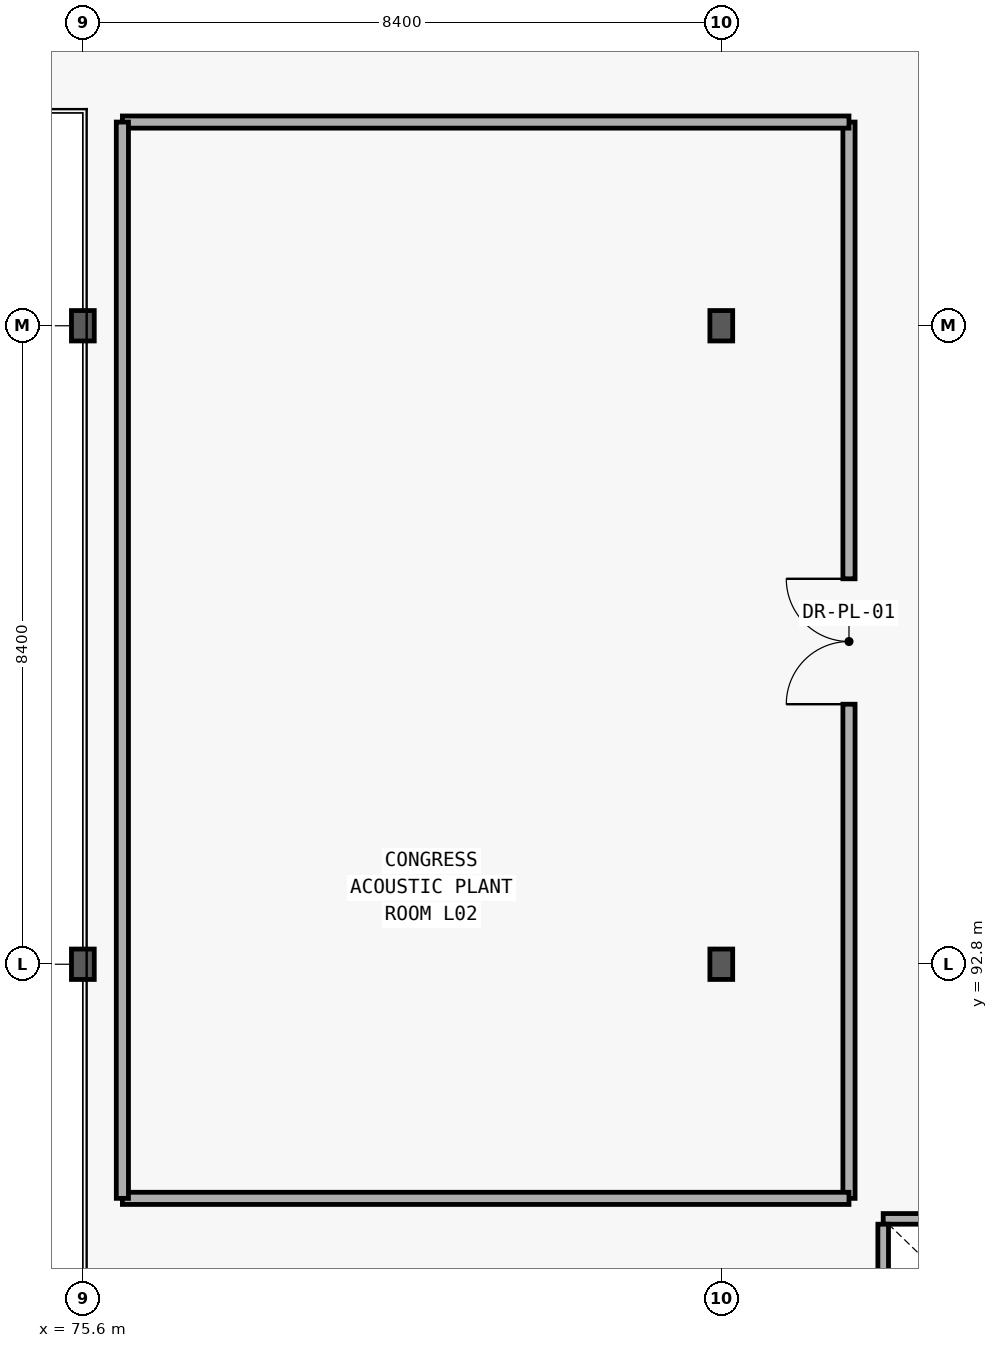
"""IFC4 building model, lengths in metres.
Left out: names, types, materials, properties, quantities, classifications, styles, units other than length and angle.
Written with IfcOpenShell. Run it as: python <this file> out.ifc"""

import sys

from ifc_helpers import new_model, si_unit, direction, frame, frame_2d, origin, origin_2d, place, context, subcontext, project, spatial, rectangle, i_section, extrude, element, fill, save


model = new_model("IFC4")
c1 = context("Model", 3, precision=1e-05, world=origin(), true_north=direction((0.0, 1.0)))
c2 = subcontext(c1, "Body", "Model", "MODEL_VIEW")
j1 = project(units=[si_unit("LENGTHUNIT", "METRE"), si_unit("PLANEANGLEUNIT", "RADIAN")], contexts=[c1])
p1 = place(None, origin())
s1 = spatial("IfcSite", under=j1, at=p1, CompositionType="ELEMENT")
p2 = place(p1, origin())
s2 = spatial("IfcBuilding", under=s1, at=p2, CompositionType="ELEMENT")
p3 = place(p2, frame((0.0, 0.0, 10.8)))
s3 = spatial("IfcBuildingStorey", under=s2, at=p3, CompositionType="ELEMENT", Elevation=10.8)
for number, where, z_axis, x_axis in (
    (1, (75.6, 92.8, 0.0), (0.0, 0.0, 1.0), (1.0, 0.0, 0.0)),
    (2, (75.6, 101.2, 0.0), (0.0, 0.0, 1.0), (1.0, 0.0, 0.0)),
    (3, (84.0, 92.8, 0.0), (0.0, 0.0, 1.0), (1.0, 0.0, 0.0)),
    (4, (84.0, 101.2, 0.0), (0.0, 0.0, 1.0), (1.0, 0.0, 0.0)),
):
    element("IfcColumn", number, at=place(p3, frame(where, z_axis=z_axis, x_axis=x_axis)), inside=s3, PredefinedType="COLUMN", context=c2, shape_type="SweptSolid", body=[
        extrude(i_section(OverallWidth=0.3, OverallDepth=0.4, WebThickness=0.013, FlangeThickness=0.024, at=origin_2d()), origin(), (0.0, 0.0, 1.0), 4.2),
    ])
p4 = place(p3, frame((85.68, 89.72, 0.0), z_axis=(0.0, 0.0, 1.0), x_axis=(0.0, 1.0, 0.0)))
e5 = element("IfcWall", 5, at=p4, inside=s3, PredefinedType="PARTITIONING", context=c2, shape_type="SweptSolid", body=[
    extrude(rectangle(XDim=14.16, YDim=0.16, at=frame_2d((7.08, 0.0))), origin(), (0.0, 0.0, 1.0), 3.02),
])
p5 = place(p4, frame((6.501, 0.0, 0.0)))
e6 = element("IfcOpeningElement", 6, at=p5, cuts=e5, PredefinedType="OPENING", context=c2, shape_type="SweptSolid", body=[
    extrude(rectangle(XDim=1.65, YDim=2.35, at=frame_2d((0.825, 1.175))), frame((0.0, 0.09, 0.0), z_axis=(0.0, -1.0, 0.0), x_axis=(1.0, 0.0, 0.0)), (0.0, 0.0, 1.0), 0.18),
])
for number, where, z_axis, x_axis in (
    (7, (76.12, 89.72, 0.0), (0.0, 0.0, 1.0), (1.0, 0.0, 0.0)),
    (8, (76.12, 103.88, 0.0), (0.0, 0.0, 1.0), (1.0, 0.0, 0.0)),
):
    element("IfcWall", number, at=place(p3, frame(where, z_axis=z_axis, x_axis=x_axis)), inside=s3, PredefinedType="PARTITIONING", context=c2, shape_type="SweptSolid", body=[
        extrude(rectangle(XDim=9.56, YDim=0.16, at=frame_2d((4.78, 0.0))), origin(), (0.0, 0.0, 1.0), 3.02),
    ])
p6 = place(p3, frame((76.12, 89.72, 0.0), z_axis=(0.0, 0.0, 1.0), x_axis=(0.0, 1.0, 0.0)))
e9 = element("IfcWall", 9, at=p6, inside=s3, PredefinedType="PARTITIONING", context=c2, shape_type="SweptSolid", body=[
    extrude(rectangle(XDim=14.16, YDim=0.16, at=frame_2d((7.08, 0.0))), origin(), (0.0, 0.0, 1.0), 3.02),
])
p7 = place(p3, frame((87.49, 89.45, 0.0), z_axis=(0.0, 0.0, 1.0), x_axis=(-1.0, 0.0, 0.0)))
e10 = element("IfcWall", 10, at=p7, inside=s3, PredefinedType="PARTITIONING", context=c2, shape_type="SweptSolid", body=[
    extrude(rectangle(XDim=1.36, YDim=0.14, at=frame_2d((0.68, 0.0))), origin(), (0.0, 0.0, 1.0), 3.04),
])
p8 = place(p3, frame((86.13, 89.38, 0.0), z_axis=(0.0, 0.0, 1.0), x_axis=(0.0, -1.0, 0.0)))
e11 = element("IfcWall", 11, at=p8, inside=s3, PredefinedType="PARTITIONING", context=c2, shape_type="SweptSolid", body=[
    extrude(rectangle(XDim=1.18, YDim=0.14, at=frame_2d((0.59, 0.0))), origin(), (0.0, 0.0, 1.0), 3.04),
])
p9 = place(p5, origin())
e12 = element("IfcDoor", 12, at=p9, inside=s3, OperationType="DOUBLE_DOOR_SINGLE_SWING", PredefinedType="DOOR", context=c2, shape_type="SweptSolid", body=[
    extrude(rectangle(XDim=1.65, YDim=2.35, at=frame_2d((0.825, 1.175))), frame((0.0, 0.025, 0.0), z_axis=(0.0, -1.0, 0.0), x_axis=(1.0, 0.0, 0.0)), (0.0, 0.0, 1.0), 0.05),
])
fill(e6, e12)
save(model, sys.argv[1])
